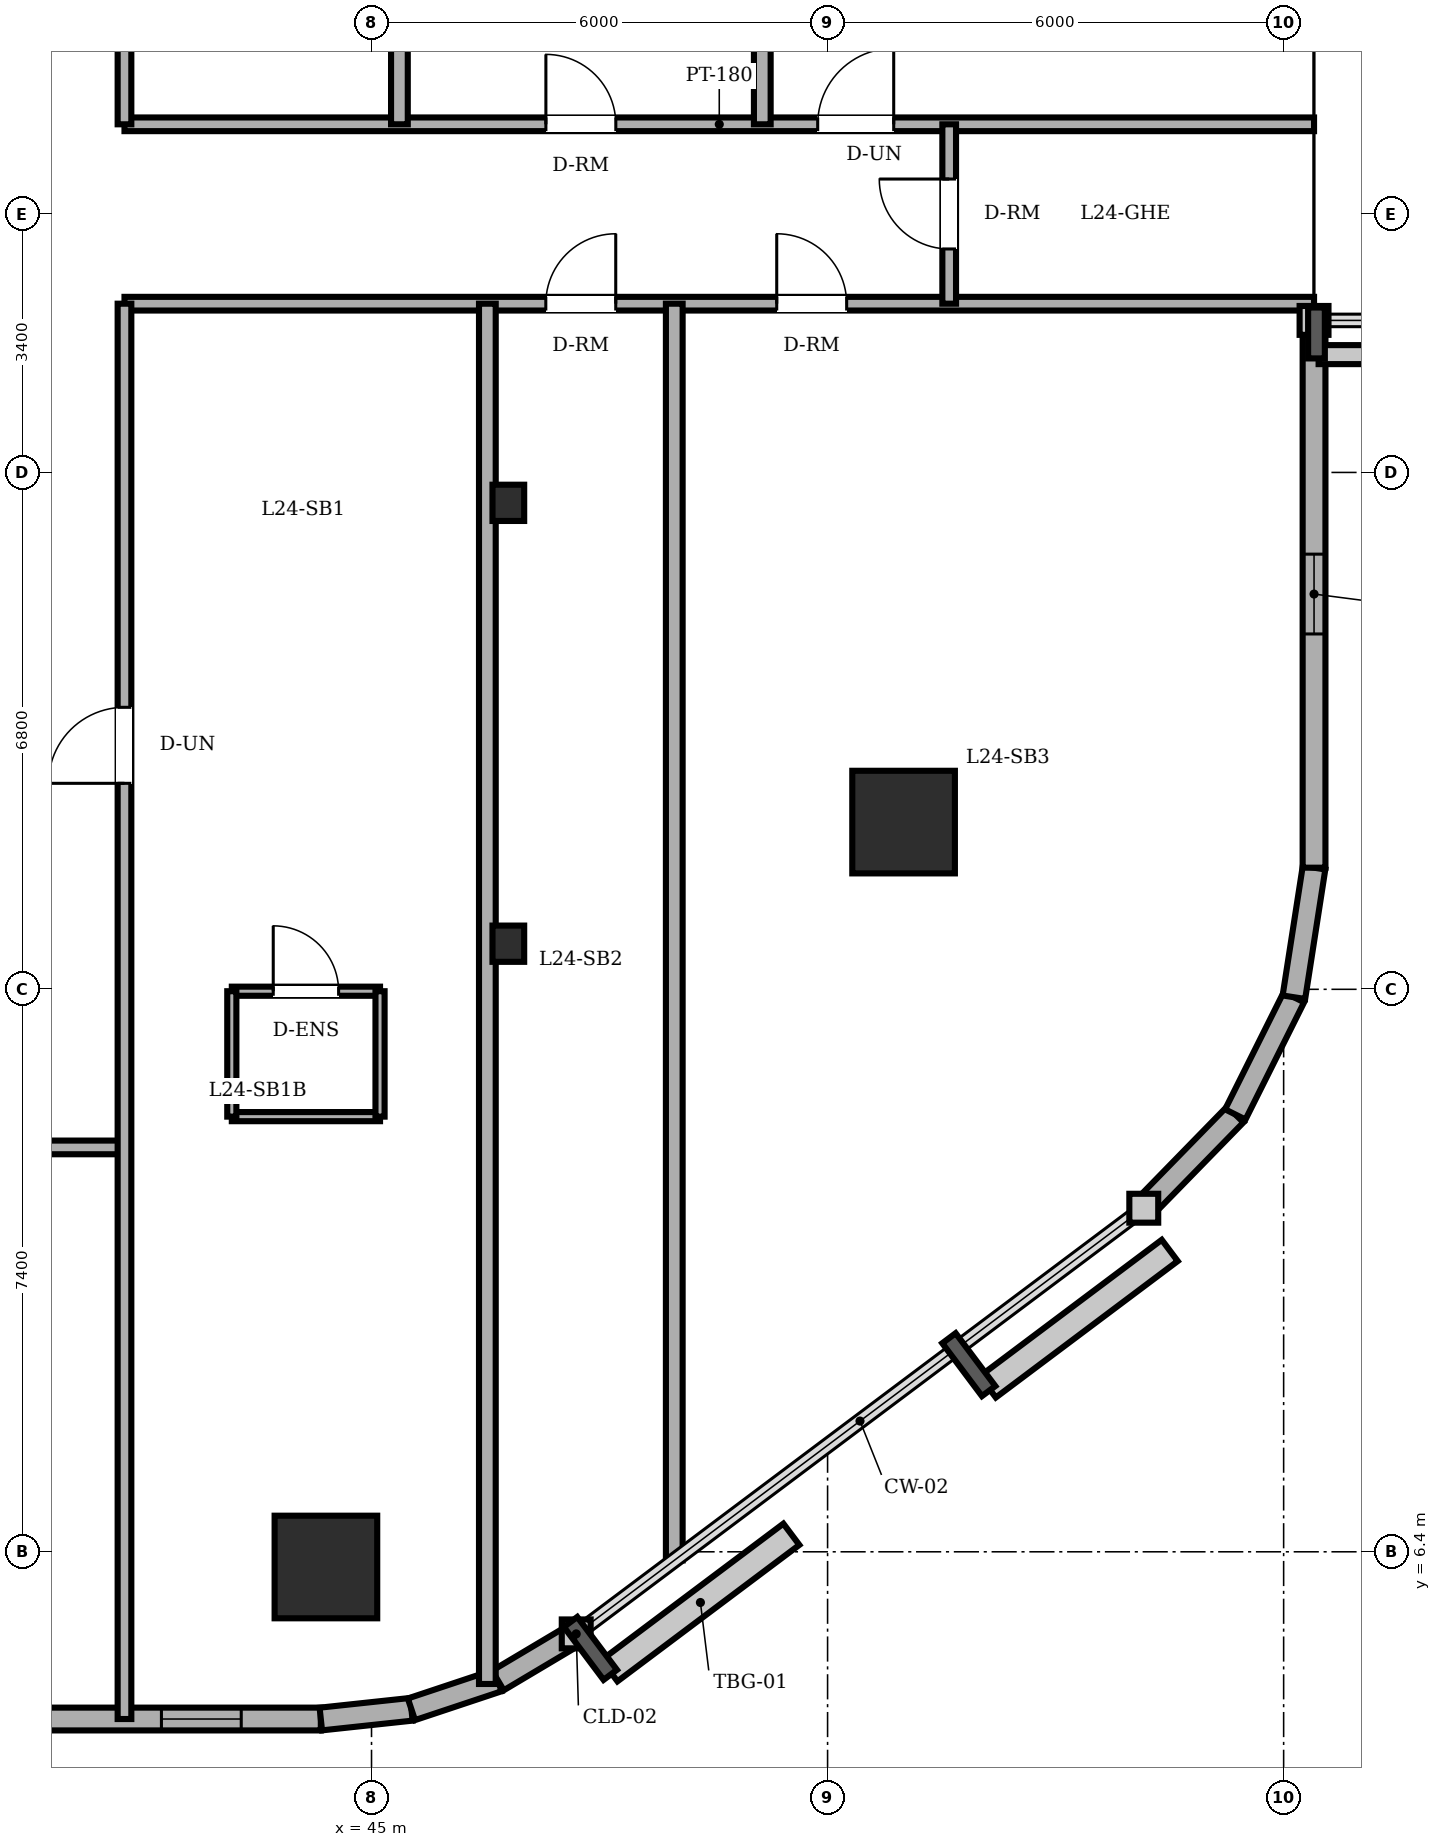
"""IFC4 building model, lengths in metres.
Left out: names, types, materials, properties, quantities, classifications, styles, units other than length and angle.
Written with IfcOpenShell. Run it as: python <this file> out.ifc"""

import sys

from ifc_helpers import new_model, si_unit, direction, frame, frame_2d, origin, origin_2d, place, context, subcontext, project, spatial, rectangle, circle, i_section, extrude, element, fill, save


model = new_model("IFC4")
c1 = context("Model", 3, precision=1e-05, world=origin(), true_north=direction((0.0, 1.0)))
c2 = subcontext(c1, "Body", "Model", "MODEL_VIEW")
j1 = project(units=[si_unit("LENGTHUNIT", "METRE"), si_unit("PLANEANGLEUNIT", "RADIAN")], contexts=[c1])
p1 = place(None, origin())
s1 = spatial("IfcSite", under=j1, at=p1, CompositionType="ELEMENT")
p2 = place(p1, origin())
s2 = spatial("IfcBuilding", under=s1, at=p2, CompositionType="ELEMENT")
p3 = place(p2, frame((0.0, 0.0, 93.5)))
s3 = spatial("IfcBuildingStorey", under=s2, at=p3, CompositionType="ELEMENT", Elevation=93.5)
for number, where, z_axis, x_axis in (
    (1, (44.4, 6.2, 0.0), (0.0, 0.0, 1.0), (1.0, 0.0, 0.0)),
    (2, (52.0, 16.0, 0.0), (0.0, 0.0, 1.0), (1.0, 0.0, 0.0)),
):
    element("IfcColumn", number, at=place(p3, frame(where, z_axis=z_axis, x_axis=x_axis)), inside=s3, PredefinedType="COLUMN", context=c2, shape_type="SweptSolid", body=[
        extrude(circle(Radius=0.675, at=origin_2d()), origin(), (0.0, 0.0, 1.0), 3.6),
    ])
for number, where, z_axis, x_axis in (
    (3, (46.8, 14.4, 0.0), (0.0, 0.0, 1.0), (1.0, 0.0, 0.0)),
    (4, (46.8, 20.2, 0.0), (0.0, 0.0, 1.0), (1.0, 0.0, 0.0)),
):
    element("IfcColumn", number, at=place(p3, frame(where, z_axis=z_axis, x_axis=x_axis)), inside=s3, PredefinedType="COLUMN", context=c2, shape_type="SweptSolid", body=[
        extrude(i_section(OverallWidth=0.417, OverallDepth=0.477, WebThickness=0.036, FlangeThickness=0.057, FilletRadius=0.015, at=origin_2d()), origin(), (0.0, 0.0, 1.0), 3.6),
    ])
p4 = place(p3, frame((14.4, 4.2, 0.0), z_axis=(0.0, 0.0, 1.0), x_axis=(1.0, 0.0, 0.0)))
e5 = element("IfcWall", 5, at=p4, inside=s3, PredefinedType="SOLIDWALL", context=c2, shape_type="SweptSolid", body=[
    extrude(rectangle(XDim=29.933, YDim=0.3, at=frame_2d((14.967, 0.0))), origin(), (0.0, 0.0, 1.0), 3.4),
])
p5 = place(p4, frame((3.85, 0.0, 0.0)))
e6 = element("IfcOpeningElement", 6, at=p5, cuts=e5, PredefinedType="OPENING", context=c2, shape_type="SweptSolid", body=[
    extrude(rectangle(XDim=0.95, YDim=2.2, at=frame_2d((0.475, 1.1))), frame((0.0, 0.16, 0.0), z_axis=(0.0, -1.0, 0.0), x_axis=(1.0, 0.0, 0.0)), (0.0, 0.0, 1.0), 0.32),
])
p6 = place(p4, frame((5.158, 0.0, 0.85)))
e7 = element("IfcOpeningElement", 7, at=p6, cuts=e5, PredefinedType="OPENING", context=c2, shape_type="SweptSolid", body=[
    extrude(rectangle(XDim=1.65, YDim=1.55, at=frame_2d((0.825, 0.775))), frame((0.0, 0.16, 0.0), z_axis=(0.0, -1.0, 0.0), x_axis=(1.0, 0.0, 0.0)), (0.0, 0.0, 1.0), 0.32),
])
p7 = place(p4, frame((9.875, 0.0, 0.85)))
e8 = element("IfcOpeningElement", 8, at=p7, cuts=e5, PredefinedType="OPENING", context=c2, shape_type="SweptSolid", body=[
    extrude(rectangle(XDim=1.65, YDim=1.55, at=frame_2d((0.825, 0.775))), frame((0.0, 0.16, 0.0), z_axis=(0.0, -1.0, 0.0), x_axis=(1.0, 0.0, 0.0)), (0.0, 0.0, 1.0), 0.32),
])
p8 = place(p4, frame((16.692, 0.0, 0.85)))
e9 = element("IfcOpeningElement", 9, at=p8, cuts=e5, PredefinedType="OPENING", context=c2, shape_type="SweptSolid", body=[
    extrude(rectangle(XDim=1.65, YDim=1.55, at=frame_2d((0.825, 0.775))), frame((0.0, 0.16, 0.0), z_axis=(0.0, -1.0, 0.0), x_axis=(1.0, 0.0, 0.0)), (0.0, 0.0, 1.0), 0.32),
])
p9 = place(p4, frame((21.608, 0.0, 0.85)))
e10 = element("IfcOpeningElement", 10, at=p9, cuts=e5, PredefinedType="OPENING", context=c2, shape_type="SweptSolid", body=[
    extrude(rectangle(XDim=1.65, YDim=1.55, at=frame_2d((0.825, 0.775))), frame((0.0, 0.16, 0.0), z_axis=(0.0, -1.0, 0.0), x_axis=(1.0, 0.0, 0.0)), (0.0, 0.0, 1.0), 0.32),
])
p10 = place(p4, frame((27.836, 0.0, 0.85)))
e11 = element("IfcOpeningElement", 11, at=p10, cuts=e5, PredefinedType="OPENING", context=c2, shape_type="SweptSolid", body=[
    extrude(rectangle(XDim=1.05, YDim=1.55, at=frame_2d((0.525, 0.775))), frame((0.0, 0.16, 0.0), z_axis=(0.0, -1.0, 0.0), x_axis=(1.0, 0.0, 0.0)), (0.0, 0.0, 1.0), 0.32),
])
p11 = place(p3, frame((44.333, 4.2, 0.0), z_axis=(0.0, 0.0, 1.0), x_axis=(0.994289103787, 0.106720092254, 0.0)))
e12 = element("IfcWall", 12, at=p11, inside=s3, PredefinedType="SOLIDWALL", context=c2, shape_type="SweptSolid", body=[
    extrude(rectangle(XDim=1.199, YDim=0.3, at=frame_2d((0.599, 0.0))), origin(), (0.0, 0.0, 1.0), 3.4),
])
p12 = place(p3, frame((45.525, 4.328, 0.0), z_axis=(0.0, 0.0, 1.0), x_axis=(0.948744332129, 0.316044604847, 0.0)))
e13 = element("IfcWall", 13, at=p12, inside=s3, PredefinedType="SOLIDWALL", context=c2, shape_type="SweptSolid", body=[
    extrude(rectangle(XDim=1.2, YDim=0.3, at=frame_2d((0.6, 0.0))), origin(), (0.0, 0.0, 1.0), 3.4),
])
p13 = place(p3, frame((46.663, 4.707, 0.0), z_axis=(0.0, 0.0, 1.0), x_axis=(0.859320591642, 0.511437308749, 0.0)))
e14 = element("IfcWall", 14, at=p13, inside=s3, PredefinedType="SOLIDWALL", context=c2, shape_type="SweptSolid", body=[
    extrude(rectangle(XDim=1.199, YDim=0.3, at=frame_2d((0.599, 0.0))), origin(), (0.0, 0.0, 1.0), 3.4),
])
for number, where, z_axis, x_axis in (
    (15, (55.16, 10.92, 0.0), (0.0, 0.0, 1.0), (0.698, 0.716, 0.0)),
    (16, (56.364, 12.154, 0.0), (0.0, 0.0, 1.0), (0.447, 0.894, 0.0)),
):
    element("IfcWall", number, at=place(p3, frame(where, z_axis=z_axis, x_axis=x_axis)), inside=s3, PredefinedType="SOLIDWALL", context=c2, shape_type="SweptSolid", body=[
        extrude(rectangle(XDim=1.724, YDim=0.3, at=frame_2d((0.862, 0.0))), origin(), (0.0, 0.0, 1.0), 3.4),
    ])
p14 = place(p3, frame((57.135, 13.696, 0.0), z_axis=(0.0, 0.0, 1.0), x_axis=(0.153620989032, 0.988129845581, 0.0)))
e17 = element("IfcWall", 17, at=p14, inside=s3, PredefinedType="SOLIDWALL", context=c2, shape_type="SweptSolid", body=[
    extrude(rectangle(XDim=1.724, YDim=0.3, at=frame_2d((0.862, 0.0))), origin(), (0.0, 0.0, 1.0), 3.4),
])
p15 = place(p3, frame((57.4, 15.4, 0.0), z_axis=(0.0, 0.0, 1.0), x_axis=(0.0, 1.0, 0.0)))
e18 = element("IfcWall", 18, at=p15, inside=s3, PredefinedType="SOLIDWALL", context=c2, shape_type="SweptSolid", body=[
    extrude(rectangle(XDim=7.2, YDim=0.3, at=frame_2d((3.6, 0.0))), origin(), (0.0, 0.0, 1.0), 3.4),
])
p16 = place(p15, frame((3.075, 0.0, 0.85)))
e19 = element("IfcOpeningElement", 19, at=p16, cuts=e18, PredefinedType="OPENING", context=c2, shape_type="SweptSolid", body=[
    extrude(rectangle(XDim=1.05, YDim=1.55, at=frame_2d((0.525, 0.775))), frame((0.0, 0.16, 0.0), z_axis=(0.0, -1.0, 0.0), x_axis=(1.0, 0.0, 0.0)), (0.0, 0.0, 1.0), 0.32),
])
p17 = place(p3, frame((43.162, 13.775, 0.0), z_axis=(0.0, 0.0, 1.0), x_axis=(1.0, 0.0, 0.0)))
e20 = element("IfcWall", 20, at=p17, inside=s3, PredefinedType="PARTITIONING", context=c2, shape_type="SweptSolid", body=[
    extrude(rectangle(XDim=1.95, YDim=0.12, at=frame_2d((0.975, 0.0))), origin(), (0.0, 0.0, 1.0), 3.4),
])
p18 = place(p17, frame((0.545, 0.0, 0.0)))
e21 = element("IfcOpeningElement", 21, at=p18, cuts=e20, PredefinedType="OPENING", context=c2, shape_type="SweptSolid", body=[
    extrude(rectangle(XDim=0.86, YDim=2.1, at=frame_2d((0.43, 1.05))), frame((0.0, 0.07, 0.0), z_axis=(0.0, -1.0, 0.0), x_axis=(1.0, 0.0, 0.0)), (0.0, 0.0, 1.0), 0.14),
])
p19 = place(p3, frame((45.112, 12.125, 0.0), z_axis=(0.0, 0.0, 1.0), x_axis=(-1.0, 0.0, 0.0)))
e22 = element("IfcWall", 22, at=p19, inside=s3, PredefinedType="PARTITIONING", context=c2, shape_type="SweptSolid", body=[
    extrude(rectangle(XDim=1.95, YDim=0.12, at=frame_2d((0.975, 0.0))), origin(), (0.0, 0.0, 1.0), 3.4),
])
for number, where, z_axis, x_axis in (
    (23, (43.162, 13.775, 0.0), (0.0, 0.0, 1.0), (0.0, -1.0, 0.0)),
    (24, (45.112, 12.125, 0.0), (0.0, 0.0, 1.0), (0.0, 1.0, 0.0)),
):
    element("IfcWall", number, at=place(p3, frame(where, z_axis=z_axis, x_axis=x_axis)), inside=s3, PredefinedType="PARTITIONING", context=c2, shape_type="SweptSolid", body=[
        extrude(rectangle(XDim=1.65, YDim=0.12, at=frame_2d((0.825, 0.0))), origin(), (0.0, 0.0, 1.0), 3.4),
    ])
p20 = place(p3, frame((8.8, 11.72, 0.0), z_axis=(0.0, 0.0, 1.0), x_axis=(1.0, 0.0, 0.0)))
e25 = element("IfcWall", 25, at=p20, inside=s3, PredefinedType="PARTITIONING", context=c2, shape_type="SweptSolid", body=[
    extrude(rectangle(XDim=32.95, YDim=0.18, at=frame_2d((16.475, 0.0))), origin(), (0.0, 0.0, 1.0), 3.4),
])
p21 = place(p20, frame((15.84, 0.0, 0.0)))
e26 = element("IfcOpeningElement", 26, at=p21, cuts=e25, PredefinedType="OPENING", context=c2, shape_type="SweptSolid", body=[
    extrude(rectangle(XDim=0.92, YDim=2.1, at=frame_2d((0.46, 1.05))), frame((0.0, 0.1, 0.0), z_axis=(0.0, -1.0, 0.0), x_axis=(1.0, 0.0, 0.0)), (0.0, 0.0, 1.0), 0.2),
])
p22 = place(p20, frame((3.101, 0.0, 0.0)))
e27 = element("IfcOpeningElement", 27, at=p22, cuts=e25, PredefinedType="OPENING", context=c2, shape_type="SweptSolid", body=[
    extrude(rectangle(XDim=0.92, YDim=2.1, at=frame_2d((0.46, 1.05))), frame((0.0, 0.1, 0.0), z_axis=(0.0, -1.0, 0.0), x_axis=(1.0, 0.0, 0.0)), (0.0, 0.0, 1.0), 0.2),
])
p23 = place(p20, frame((9.701, 0.0, 0.0)))
e28 = element("IfcOpeningElement", 28, at=p23, cuts=e25, PredefinedType="OPENING", context=c2, shape_type="SweptSolid", body=[
    extrude(rectangle(XDim=0.92, YDim=2.1, at=frame_2d((0.46, 1.05))), frame((0.0, 0.1, 0.0), z_axis=(0.0, -1.0, 0.0), x_axis=(1.0, 0.0, 0.0)), (0.0, 0.0, 1.0), 0.2),
])
p24 = place(p20, frame((24.855, 0.0, 0.0)))
e29 = element("IfcOpeningElement", 29, at=p24, cuts=e25, PredefinedType="OPENING", context=c2, shape_type="SweptSolid", body=[
    extrude(rectangle(XDim=0.92, YDim=2.1, at=frame_2d((0.46, 1.05))), frame((0.0, 0.1, 0.0), z_axis=(0.0, -1.0, 0.0), x_axis=(1.0, 0.0, 0.0)), (0.0, 0.0, 1.0), 0.2),
])
p25 = place(p3, frame((41.75, 22.82, 0.0), z_axis=(0.0, 0.0, 1.0), x_axis=(1.0, 0.0, 0.0)))
e30 = element("IfcWall", 30, at=p25, inside=s3, PredefinedType="PARTITIONING", context=c2, shape_type="SweptSolid", body=[
    extrude(rectangle(XDim=15.65, YDim=0.18, at=frame_2d((7.825, 0.0))), origin(), (0.0, 0.0, 1.0), 3.4),
])
p26 = place(p25, frame((5.543, 0.0, 0.0)))
e31 = element("IfcOpeningElement", 31, at=p26, cuts=e30, PredefinedType="OPENING", context=c2, shape_type="SweptSolid", body=[
    extrude(rectangle(XDim=0.92, YDim=2.1, at=frame_2d((0.46, 1.05))), frame((0.0, 0.1, 0.0), z_axis=(0.0, -1.0, 0.0), x_axis=(1.0, 0.0, 0.0)), (0.0, 0.0, 1.0), 0.2),
])
p27 = place(p25, frame((8.581, 0.0, 0.0)))
e32 = element("IfcOpeningElement", 32, at=p27, cuts=e30, PredefinedType="OPENING", context=c2, shape_type="SweptSolid", body=[
    extrude(rectangle(XDim=0.92, YDim=2.1, at=frame_2d((0.46, 1.05))), frame((0.0, 0.1, 0.0), z_axis=(0.0, -1.0, 0.0), x_axis=(1.0, 0.0, 0.0)), (0.0, 0.0, 1.0), 0.2),
])
p28 = place(p3, frame((41.75, 25.18, 0.0), z_axis=(0.0, 0.0, 1.0), x_axis=(1.0, 0.0, 0.0)))
e33 = element("IfcWall", 33, at=p28, inside=s3, PredefinedType="PARTITIONING", context=c2, shape_type="SweptSolid", body=[
    extrude(rectangle(XDim=15.65, YDim=0.18, at=frame_2d((7.825, 0.0))), origin(), (0.0, 0.0, 1.0), 3.4),
])
p29 = place(p28, frame((5.544, 0.0, 0.0)))
e34 = element("IfcOpeningElement", 34, at=p29, cuts=e33, PredefinedType="OPENING", context=c2, shape_type="SweptSolid", body=[
    extrude(rectangle(XDim=0.92, YDim=2.1, at=frame_2d((0.46, 1.05))), frame((0.0, 0.1, 0.0), z_axis=(0.0, -1.0, 0.0), x_axis=(1.0, 0.0, 0.0)), (0.0, 0.0, 1.0), 0.2),
])
p30 = place(p28, frame((9.12, 0.0, 0.0)))
e35 = element("IfcOpeningElement", 35, at=p30, cuts=e33, PredefinedType="OPENING", context=c2, shape_type="SweptSolid", body=[
    extrude(rectangle(XDim=1.0, YDim=2.15, at=frame_2d((0.5, 1.075))), frame((0.0, 0.1, 0.0), z_axis=(0.0, -1.0, 0.0), x_axis=(1.0, 0.0, 0.0)), (0.0, 0.0, 1.0), 0.2),
])
p31 = place(p3, frame((41.75, 4.2, 0.0), z_axis=(0.0, 0.0, 1.0), x_axis=(0.0, 1.0, 0.0)))
e36 = element("IfcWall", 36, at=p31, inside=s3, PredefinedType="PARTITIONING", context=c2, shape_type="SweptSolid", body=[
    extrude(rectangle(XDim=18.62, YDim=0.18, at=frame_2d((9.31, 0.0))), origin(), (0.0, 0.0, 1.0), 3.4),
])
p32 = place(p31, frame((12.31, 0.0, 0.0)))
e37 = element("IfcOpeningElement", 37, at=p32, cuts=e36, PredefinedType="OPENING", context=c2, shape_type="SweptSolid", body=[
    extrude(rectangle(XDim=1.0, YDim=2.15, at=frame_2d((0.5, 1.075))), frame((0.0, 0.1, 0.0), z_axis=(0.0, -1.0, 0.0), x_axis=(1.0, 0.0, 0.0)), (0.0, 0.0, 1.0), 0.2),
])
p33 = place(p3, frame((41.75, 25.18, 0.0), z_axis=(0.0, 0.0, 1.0), x_axis=(0.0, 1.0, 0.0)))
e38 = element("IfcWall", 38, at=p33, inside=s3, PredefinedType="PARTITIONING", context=c2, shape_type="SweptSolid", body=[
    extrude(rectangle(XDim=18.62, YDim=0.18, at=frame_2d((9.31, 0.0))), origin(), (0.0, 0.0, 1.0), 3.4),
])
p34 = place(p33, frame((5.31, 0.0, 0.0)))
e39 = element("IfcOpeningElement", 39, at=p34, cuts=e38, PredefinedType="OPENING", context=c2, shape_type="SweptSolid", body=[
    extrude(rectangle(XDim=1.0, YDim=2.15, at=frame_2d((0.5, 1.075))), frame((0.0, 0.1, 0.0), z_axis=(0.0, -1.0, 0.0), x_axis=(1.0, 0.0, 0.0)), (0.0, 0.0, 1.0), 0.2),
])
p35 = place(p3, frame((45.367, 25.18, 0.0), z_axis=(0.0, 0.0, 1.0), x_axis=(0.0, 1.0, 0.0)))
e40 = element("IfcWall", 40, at=p35, inside=s3, PredefinedType="PARTITIONING", context=c2, shape_type="SweptSolid", body=[
    extrude(rectangle(XDim=18.509, YDim=0.22, at=frame_2d((9.254, 0.0))), origin(), (0.0, 0.0, 1.0), 2.882),
])
p36 = place(p3, frame((46.524, 4.661, 0.0), z_axis=(0.0, 0.0, 1.0), x_axis=(0.0, 1.0, 0.0)))
e41 = element("IfcWall", 41, at=p36, inside=s3, PredefinedType="PARTITIONING", context=c2, shape_type="SweptSolid", body=[
    extrude(rectangle(XDim=18.159, YDim=0.22, at=frame_2d((9.08, 0.0))), origin(), (0.0, 0.0, 1.0), 2.882),
])
p37 = place(p3, frame((48.983, 6.287, 0.0), z_axis=(0.0, 0.0, 1.0), x_axis=(0.0, 1.0, 0.0)))
e42 = element("IfcWall", 42, at=p37, inside=s3, PredefinedType="PARTITIONING", context=c2, shape_type="SweptSolid", body=[
    extrude(rectangle(XDim=16.533, YDim=0.22, at=frame_2d((8.267, 0.0))), origin(), (0.0, 0.0, 1.0), 3.4),
])
p38 = place(p3, frame((50.141, 25.18, 0.0), z_axis=(0.0, 0.0, 1.0), x_axis=(0.0, 1.0, 0.0)))
e43 = element("IfcWall", 43, at=p38, inside=s3, PredefinedType="PARTITIONING", context=c2, shape_type="SweptSolid", body=[
    extrude(rectangle(XDim=15.664, YDim=0.22, at=frame_2d((7.832, 0.0))), origin(), (0.0, 0.0, 1.0), 3.4),
])
p39 = place(p3, frame((52.6, 22.82, 0.0), z_axis=(0.0, 0.0, 1.0), x_axis=(0.0, 1.0, 0.0)))
e44 = element("IfcWall", 44, at=p39, inside=s3, PredefinedType="PARTITIONING", context=c2, shape_type="SweptSolid", body=[
    extrude(rectangle(XDim=2.36, YDim=0.18, at=frame_2d((1.18, 0.0))), origin(), (0.0, 0.0, 1.0), 3.4),
])
p40 = place(p39, frame((0.72, 0.0, 0.0)))
e45 = element("IfcOpeningElement", 45, at=p40, cuts=e44, PredefinedType="OPENING", context=c2, shape_type="SweptSolid", body=[
    extrude(rectangle(XDim=0.92, YDim=2.1, at=frame_2d((0.46, 1.05))), frame((0.0, 0.1, 0.0), z_axis=(0.0, -1.0, 0.0), x_axis=(1.0, 0.0, 0.0)), (0.0, 0.0, 1.0), 0.2),
])
p41 = place(p16, origin())
e46 = element("IfcWindow", 46, at=p41, inside=s3, PartitioningType="SINGLE_PANEL", PredefinedType="WINDOW", context=c2, shape_type="SweptSolid", body=[
    extrude(rectangle(XDim=1.05, YDim=1.55, at=frame_2d((0.525, 0.775))), frame((0.0, 0.03, 0.0), z_axis=(0.0, -1.0, 0.0), x_axis=(1.0, 0.0, 0.0)), (0.0, 0.0, 1.0), 0.06),
])
fill(e19, e46)
p42 = place(p10, origin())
e47 = element("IfcWindow", 47, at=p42, inside=s3, PartitioningType="SINGLE_PANEL", PredefinedType="WINDOW", context=c2, shape_type="SweptSolid", body=[
    extrude(rectangle(XDim=1.05, YDim=1.55, at=frame_2d((0.525, 0.775))), frame((0.0, 0.03, 0.0), z_axis=(0.0, -1.0, 0.0), x_axis=(1.0, 0.0, 0.0)), (0.0, 0.0, 1.0), 0.06),
])
fill(e11, e47)
p43 = place(p18, origin())
e48 = element("IfcDoor", 48, at=p43, inside=s3, OperationType="SINGLE_SWING_LEFT", PredefinedType="DOOR", context=c2, shape_type="SweptSolid", body=[
    extrude(rectangle(XDim=0.86, YDim=2.1, at=frame_2d((0.43, 1.05))), frame((0.0, 0.025, 0.0), z_axis=(0.0, -1.0, 0.0), x_axis=(1.0, 0.0, 0.0)), (0.0, 0.0, 1.0), 0.05),
])
fill(e21, e48)
p44 = place(p29, origin())
e49 = element("IfcDoor", 49, at=p44, inside=s3, OperationType="SINGLE_SWING_LEFT", PredefinedType="DOOR", context=c2, shape_type="SweptSolid", body=[
    extrude(rectangle(XDim=0.92, YDim=2.1, at=frame_2d((0.46, 1.05))), frame((0.0, 0.025, 0.0), z_axis=(0.0, -1.0, 0.0), x_axis=(1.0, 0.0, 0.0)), (0.0, 0.0, 1.0), 0.05),
])
fill(e34, e49)
p45 = place(p30, origin())
e50 = element("IfcDoor", 50, at=p45, inside=s3, OperationType="SINGLE_SWING_RIGHT", PredefinedType="DOOR", context=c2, shape_type="SweptSolid", body=[
    extrude(rectangle(XDim=1.0, YDim=2.15, at=frame_2d((0.5, 1.075))), frame((0.0, 0.025, 0.0), z_axis=(0.0, -1.0, 0.0), x_axis=(1.0, 0.0, 0.0)), (0.0, 0.0, 1.0), 0.05),
])
fill(e35, e50)
p46 = place(p32, origin())
e51 = element("IfcDoor", 51, at=p46, inside=s3, OperationType="SINGLE_SWING_LEFT", PredefinedType="DOOR", context=c2, shape_type="SweptSolid", body=[
    extrude(rectangle(XDim=1.0, YDim=2.15, at=frame_2d((0.5, 1.075))), frame((0.0, 0.025, 0.0), z_axis=(0.0, -1.0, 0.0), x_axis=(1.0, 0.0, 0.0)), (0.0, 0.0, 1.0), 0.05),
])
fill(e37, e51)
p47 = place(p26, origin())
e52 = element("IfcDoor", 52, at=p47, inside=s3, OperationType="SINGLE_SWING_RIGHT", PredefinedType="DOOR", context=c2, shape_type="SweptSolid", body=[
    extrude(rectangle(XDim=0.92, YDim=2.1, at=frame_2d((0.46, 1.05))), frame((0.0, 0.025, 0.0), z_axis=(0.0, -1.0, 0.0), x_axis=(1.0, 0.0, 0.0)), (0.0, 0.0, 1.0), 0.05),
])
fill(e31, e52)
p48 = place(p27, origin())
e53 = element("IfcDoor", 53, at=p48, inside=s3, OperationType="SINGLE_SWING_LEFT", PredefinedType="DOOR", context=c2, shape_type="SweptSolid", body=[
    extrude(rectangle(XDim=0.92, YDim=2.1, at=frame_2d((0.46, 1.05))), frame((0.0, 0.025, 0.0), z_axis=(0.0, -1.0, 0.0), x_axis=(1.0, 0.0, 0.0)), (0.0, 0.0, 1.0), 0.05),
])
fill(e32, e53)
p49 = place(p40, origin())
e54 = element("IfcDoor", 54, at=p49, inside=s3, OperationType="SINGLE_SWING_RIGHT", PredefinedType="DOOR", context=c2, shape_type="SweptSolid", body=[
    extrude(rectangle(XDim=0.92, YDim=2.1, at=frame_2d((0.46, 1.05))), frame((0.0, 0.025, 0.0), z_axis=(0.0, -1.0, 0.0), x_axis=(1.0, 0.0, 0.0)), (0.0, 0.0, 1.0), 0.05),
])
fill(e45, e54)
save(model, sys.argv[1])
